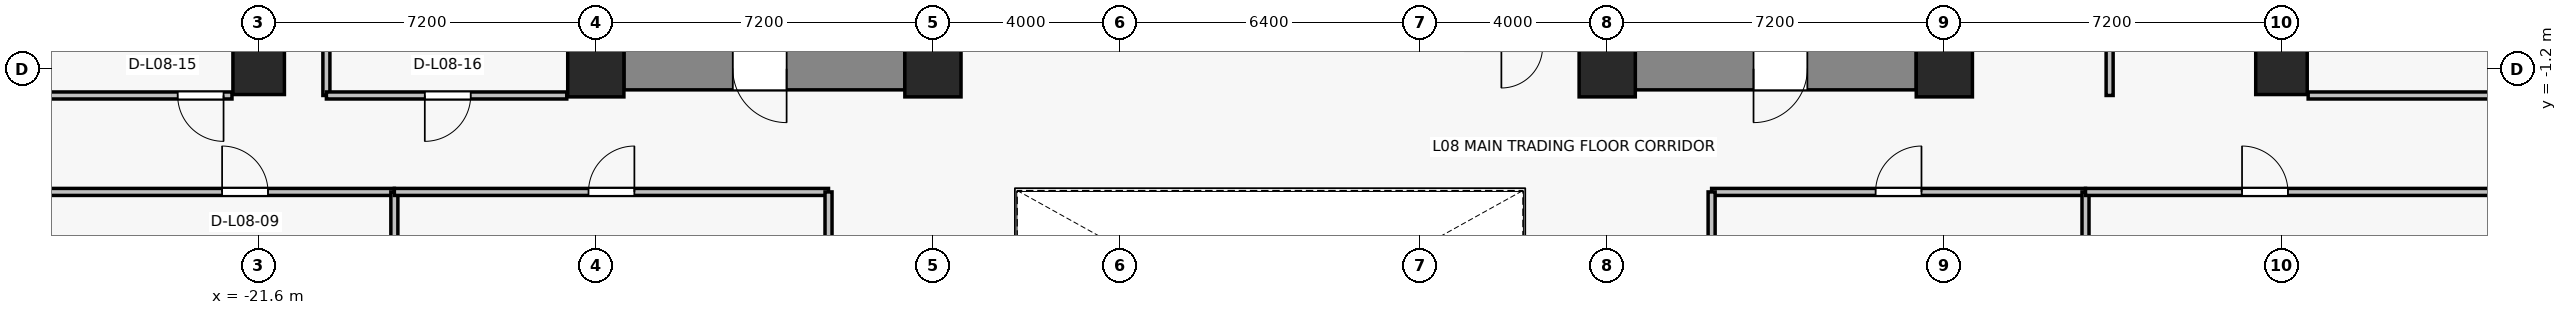
"""IFC4 building model, lengths in metres.
Left out: names, types, materials, properties, quantities, classifications, styles, units other than length and angle.
Written with IfcOpenShell. Run it as: python <this file> out.ifc"""

import sys

from ifc_helpers import new_model, si_unit, direction, frame, frame_2d, origin, origin_2d, place, context, subcontext, project, spatial, rectangle, extrude, source, transform, mapped, element, fill, save


model = new_model("IFC4")
c1 = context("Model", 3, precision=1e-05, world=origin(), true_north=direction((0.0, 1.0)))
c2 = subcontext(c1, "Body", "Model", "MODEL_VIEW")
j1 = project(units=[si_unit("LENGTHUNIT", "METRE"), si_unit("PLANEANGLEUNIT", "RADIAN")], contexts=[c1])
p1 = place(None, origin())
s1 = spatial("IfcSite", under=j1, at=p1, CompositionType="ELEMENT")
p2 = place(p1, origin())
s2 = spatial("IfcBuilding", under=s1, at=p2, CompositionType="ELEMENT")
p3 = place(p2, frame((0.0, 0.0, 34.0)))
s3 = spatial("IfcBuildingStorey", under=s2, at=p3, CompositionType="ELEMENT", Elevation=34.0)
for number, where, z_axis, x_axis in (
    (1, (-14.4, -1.2, 0.0), (0.0, 0.0, 1.0), (1.0, 0.0, 0.0)),
    (2, (-7.2, -1.2, 0.0), (0.0, 0.0, 1.0), (1.0, 0.0, 0.0)),
    (3, (7.2, -1.2, 0.0), (0.0, 0.0, 1.0), (1.0, 0.0, 0.0)),
    (4, (14.4, -1.2, 0.0), (0.0, 0.0, 1.0), (1.0, 0.0, 0.0)),
):
    element("IfcColumn", number, at=place(p3, frame(where, z_axis=z_axis, x_axis=x_axis)), inside=s3, PredefinedType="COLUMN", context=c2, shape_type="SweptSolid", body=[
        extrude(rectangle(XDim=1.2, YDim=1.2, at=origin_2d()), origin(), (0.0, 0.0, 1.0), 3.3),
    ])
for number, where, z_axis, x_axis in (
    (5, (-21.6, -1.2, 0.0), (0.0, 0.0, 1.0), (1.0, 0.0, 0.0)),
    (6, (21.6, -1.2, 0.0), (0.0, 0.0, 1.0), (1.0, 0.0, 0.0)),
):
    element("IfcColumn", number, at=place(p3, frame(where, z_axis=z_axis, x_axis=x_axis)), inside=s3, PredefinedType="COLUMN", context=c2, shape_type="SweptSolid", body=[
        extrude(rectangle(XDim=1.1, YDim=1.1, at=origin_2d()), origin(), (0.0, 0.0, 1.0), 3.3),
    ])
p4 = place(p3, frame((-7.8, -1.2, 0.0), z_axis=(0.0, 0.0, 1.0), x_axis=(-1.0, 0.0, 0.0)))
e7 = element("IfcWall", 7, at=p4, inside=s3, PredefinedType="SHEAR", context=c2, shape_type="SweptSolid", body=[
    extrude(rectangle(XDim=6.0, YDim=0.9, at=frame_2d((3.0, 0.0))), origin(), (0.0, 0.0, 1.0), 3.075),
])
p5 = place(p4, frame((2.525, 0.0, 0.0)))
e8 = element("IfcOpeningElement", 8, at=p5, cuts=e7, PredefinedType="OPENING", context=c2, shape_type="SweptSolid", body=[
    extrude(rectangle(XDim=1.15, YDim=2.15, at=frame_2d((0.575, 1.075))), frame((0.0, 0.46, 0.0), z_axis=(0.0, -1.0, 0.0), x_axis=(1.0, 0.0, 0.0)), (0.0, 0.0, 1.0), 0.92),
])
p6 = place(p3, frame((13.8, -1.2, 0.0), z_axis=(0.0, 0.0, 1.0), x_axis=(-1.0, 0.0, 0.0)))
e9 = element("IfcWall", 9, at=p6, inside=s3, PredefinedType="SHEAR", context=c2, shape_type="SweptSolid", body=[
    extrude(rectangle(XDim=6.0, YDim=0.9, at=frame_2d((3.0, 0.0))), origin(), (0.0, 0.0, 1.0), 3.075),
])
p7 = place(p6, frame((2.325, 0.0, 0.0)))
e10 = element("IfcOpeningElement", 10, at=p7, cuts=e9, PredefinedType="OPENING", context=c2, shape_type="SweptSolid", body=[
    extrude(rectangle(XDim=1.15, YDim=2.15, at=frame_2d((0.575, 1.075))), frame((0.0, 0.46, 0.0), z_axis=(0.0, -1.0, 0.0), x_axis=(1.0, 0.0, 0.0)), (0.0, 0.0, 1.0), 0.92),
])
p8 = place(p3, frame((-32.53, -3.83, 0.0), z_axis=(0.0, 0.0, 1.0), x_axis=(1.0, 0.0, 0.0)))
e11 = element("IfcWall", 11, at=p8, inside=s3, PredefinedType="PARTITIONING", context=c2, shape_type="SweptSolid", body=[
    extrude(rectangle(XDim=13.828, YDim=0.15, at=frame_2d((6.914, 0.0))), origin(), (0.0, 0.0, 1.0), 2.465),
])
p9 = place(p8, frame((10.149, 0.0, 0.0)))
e12 = element("IfcOpeningElement", 12, at=p9, cuts=e11, PredefinedType="OPENING", context=c2, shape_type="SweptSolid", body=[
    extrude(rectangle(XDim=0.98, YDim=2.15, at=frame_2d((0.49, 1.075))), frame((0.0, 0.085, 0.0), z_axis=(0.0, -1.0, 0.0), x_axis=(1.0, 0.0, 0.0)), (0.0, 0.0, 1.0), 0.17),
])
p10 = place(p3, frame((-18.702, -3.83, 0.0), z_axis=(0.0, 0.0, 1.0), x_axis=(0.0, -1.0, 0.0)))
e13 = element("IfcWall", 13, at=p10, inside=s3, PredefinedType="PARTITIONING", context=c2, shape_type="SweptSolid", body=[
    extrude(rectangle(XDim=6.69, YDim=0.15, at=frame_2d((3.345, 0.0))), origin(), (0.0, 0.0, 1.0), 2.465),
])
p11 = place(p3, frame((-18.702, -3.83, 0.0), z_axis=(0.0, 0.0, 1.0), x_axis=(1.0, 0.0, 0.0)))
e14 = element("IfcWall", 14, at=p11, inside=s3, PredefinedType="PARTITIONING", context=c2, shape_type="SweptSolid", body=[
    extrude(rectangle(XDim=9.272, YDim=0.15, at=frame_2d((4.636, 0.0))), origin(), (0.0, 0.0, 1.0), 2.465),
])
p12 = place(p11, frame((4.146, 0.0, 0.0)))
e15 = element("IfcOpeningElement", 15, at=p12, cuts=e14, PredefinedType="OPENING", context=c2, shape_type="SweptSolid", body=[
    extrude(rectangle(XDim=0.98, YDim=2.15, at=frame_2d((0.49, 1.075))), frame((0.0, 0.085, 0.0), z_axis=(0.0, -1.0, 0.0), x_axis=(1.0, 0.0, 0.0)), (0.0, 0.0, 1.0), 0.17),
])
p13 = place(p3, frame((-9.43, -3.83, 0.0), z_axis=(0.0, 0.0, 1.0), x_axis=(0.0, -1.0, 0.0)))
e16 = element("IfcWall", 16, at=p13, inside=s3, PredefinedType="PARTITIONING", context=c2, shape_type="SweptSolid", body=[
    extrude(rectangle(XDim=6.69, YDim=0.15, at=frame_2d((3.345, 0.0))), origin(), (0.0, 0.0, 1.0), 2.465),
])
p14 = place(p3, frame((9.43, -3.83, 0.0), z_axis=(0.0, 0.0, 1.0), x_axis=(1.0, 0.0, 0.0)))
e17 = element("IfcWall", 17, at=p14, inside=s3, PredefinedType="PARTITIONING", context=c2, shape_type="SweptSolid", body=[
    extrude(rectangle(XDim=7.985, YDim=0.15, at=frame_2d((3.993, 0.0))), origin(), (0.0, 0.0, 1.0), 2.465),
])
p15 = place(p14, frame((3.502, 0.0, 0.0)))
e18 = element("IfcOpeningElement", 18, at=p15, cuts=e17, PredefinedType="OPENING", context=c2, shape_type="SweptSolid", body=[
    extrude(rectangle(XDim=0.98, YDim=2.15, at=frame_2d((0.49, 1.075))), frame((0.0, 0.085, 0.0), z_axis=(0.0, -1.0, 0.0), x_axis=(1.0, 0.0, 0.0)), (0.0, 0.0, 1.0), 0.17),
])
for number, where, z_axis, x_axis in (
    (19, (9.43, -10.52, 0.0), (0.0, 0.0, 1.0), (0.0, 1.0, 0.0)),
    (20, (17.415, -3.83, 0.0), (0.0, 0.0, 1.0), (0.0, -1.0, 0.0)),
):
    element("IfcWall", number, at=place(p3, frame(where, z_axis=z_axis, x_axis=x_axis)), inside=s3, PredefinedType="PARTITIONING", context=c2, shape_type="SweptSolid", body=[
        extrude(rectangle(XDim=6.69, YDim=0.15, at=frame_2d((3.345, 0.0))), origin(), (0.0, 0.0, 1.0), 2.465),
    ])
p16 = place(p3, frame((17.415, -3.83, 0.0), z_axis=(0.0, 0.0, 1.0), x_axis=(1.0, 0.0, 0.0)))
e21 = element("IfcWall", 21, at=p16, inside=s3, PredefinedType="PARTITIONING", context=c2, shape_type="SweptSolid", body=[
    extrude(rectangle(XDim=11.115, YDim=0.15, at=frame_2d((5.558, 0.0))), origin(), (0.0, 0.0, 1.0), 2.465),
])
p17 = place(p16, frame((3.343, 0.0, 0.0)))
e22 = element("IfcOpeningElement", 22, at=p17, cuts=e21, PredefinedType="OPENING", context=c2, shape_type="SweptSolid", body=[
    extrude(rectangle(XDim=0.98, YDim=2.15, at=frame_2d((0.49, 1.075))), frame((0.0, 0.085, 0.0), z_axis=(0.0, -1.0, 0.0), x_axis=(1.0, 0.0, 0.0)), (0.0, 0.0, 1.0), 0.17),
])
p18 = place(p3, frame((-22.17, -1.77, 0.0), z_axis=(0.0, 0.0, 1.0), x_axis=(-1.0, 0.0, 0.0)))
e23 = element("IfcWall", 23, at=p18, inside=s3, PredefinedType="PARTITIONING", context=c2, shape_type="SweptSolid", body=[
    extrude(rectangle(XDim=5.177, YDim=0.15, at=frame_2d((2.588, 0.0))), origin(), (0.0, 0.0, 1.0), 3.075),
])
p19 = place(p18, frame((0.18, 0.0, 0.0)))
e24 = element("IfcOpeningElement", 24, at=p19, cuts=e23, PredefinedType="OPENING", context=c2, shape_type="SweptSolid", body=[
    extrude(rectangle(XDim=0.98, YDim=2.15, at=frame_2d((0.49, 1.075))), frame((0.0, 0.085, 0.0), z_axis=(0.0, -1.0, 0.0), x_axis=(1.0, 0.0, 0.0)), (0.0, 0.0, 1.0), 0.17),
])
p20 = place(p3, frame((-20.154, 13.88, 0.0), z_axis=(0.0, 0.0, 1.0), x_axis=(0.0, -1.0, 0.0)))
e25 = element("IfcWall", 25, at=p20, inside=s3, PredefinedType="PARTITIONING", context=c2, shape_type="SweptSolid", body=[
    extrude(rectangle(XDim=15.65, YDim=0.15, at=frame_2d((7.825, 0.0))), origin(), (0.0, 0.0, 1.0), 2.465),
])
p21 = place(p3, frame((-15.02, -1.77, 0.0), z_axis=(0.0, 0.0, 1.0), x_axis=(-1.0, 0.0, 0.0)))
e26 = element("IfcWall", 26, at=p21, inside=s3, PredefinedType="PARTITIONING", context=c2, shape_type="SweptSolid", body=[
    extrude(rectangle(XDim=5.134, YDim=0.15, at=frame_2d((2.567, 0.0))), origin(), (0.0, 0.0, 1.0), 3.075),
])
p22 = place(p21, frame((2.052, 0.0, 0.0)))
e27 = element("IfcOpeningElement", 27, at=p22, cuts=e26, PredefinedType="OPENING", context=c2, shape_type="SweptSolid", body=[
    extrude(rectangle(XDim=0.98, YDim=2.15, at=frame_2d((0.49, 1.075))), frame((0.0, 0.085, 0.0), z_axis=(0.0, -1.0, 0.0), x_axis=(1.0, 0.0, 0.0)), (0.0, 0.0, 1.0), 0.17),
])
p23 = place(p3, frame((28.53, -1.77, 0.0), z_axis=(0.0, 0.0, 1.0), x_axis=(-1.0, 0.0, 0.0)))
e28 = element("IfcWall", 28, at=p23, inside=s3, PredefinedType="PARTITIONING", context=c2, shape_type="SweptSolid", body=[
    extrude(rectangle(XDim=6.36, YDim=0.15, at=frame_2d((3.18, 0.0))), origin(), (0.0, 0.0, 1.0), 2.465),
])
p24 = place(p3, frame((17.93, -1.77, 0.0), z_axis=(0.0, 0.0, 1.0), x_axis=(0.0, 1.0, 0.0)))
e29 = element("IfcWall", 29, at=p24, inside=s3, PredefinedType="PARTITIONING", context=c2, shape_type="SweptSolid", body=[
    extrude(rectangle(XDim=9.103, YDim=0.15, at=frame_2d((4.551, 0.0))), origin(), (0.0, 0.0, 1.0), 2.465),
])
p25 = place(p24, frame((4.061, 0.0, 0.0)))
e30 = element("IfcOpeningElement", 30, at=p25, cuts=e29, PredefinedType="OPENING", context=c2, shape_type="SweptSolid", body=[
    extrude(rectangle(XDim=0.98, YDim=2.15, at=frame_2d((0.49, 1.075))), frame((0.0, 0.085, 0.0), z_axis=(0.0, -1.0, 0.0), x_axis=(1.0, 0.0, 0.0)), (0.0, 0.0, 1.0), 0.17),
])
m1 = source(origin(), c2, "Body", "SweptSolid", [
    extrude(rectangle(XDim=1.15, YDim=2.15, at=frame_2d((0.575, 1.075))), frame((0.0, 0.025, 0.0), z_axis=(0.0, -1.0, 0.0), x_axis=(1.0, 0.0, 0.0)), (0.0, 0.0, 1.0), 0.05),
])
p26 = place(p5, origin())
e31 = element("IfcDoor", 31, at=p26, inside=s3, OperationType="SINGLE_SWING_LEFT", PredefinedType="DOOR", context=c2, shape_type="MappedRepresentation", body=[
    mapped(m1, transform((0.0, 0.0, 0.0), x_axis=(1.0, 0.0, 0.0), y_axis=(0.0, 1.0, 0.0), z_axis=(0.0, 0.0, 1.0), scale=1.0)),
])
fill(e8, e31)
p27 = place(p7, origin())
e32 = element("IfcDoor", 32, at=p27, inside=s3, OperationType="SINGLE_SWING_RIGHT", PredefinedType="DOOR", context=c2, shape_type="MappedRepresentation", body=[
    mapped(m1, transform((0.0, 0.0, 0.0), x_axis=(1.0, 0.0, 0.0), y_axis=(0.0, 1.0, 0.0), z_axis=(0.0, 0.0, 1.0), scale=1.0)),
])
fill(e10, e32)
m2 = source(origin(), c2, "Body", "SweptSolid", [
    extrude(rectangle(XDim=0.98, YDim=2.15, at=frame_2d((0.49, 1.075))), frame((0.0, 0.025, 0.0), z_axis=(0.0, -1.0, 0.0), x_axis=(1.0, 0.0, 0.0)), (0.0, 0.0, 1.0), 0.05),
])
p28 = place(p9, origin())
e33 = element("IfcDoor", 33, at=p28, inside=s3, OperationType="SINGLE_SWING_LEFT", PredefinedType="DOOR", context=c2, shape_type="MappedRepresentation", body=[
    mapped(m2, transform((0.0, 0.0, 0.0), x_axis=(1.0, 0.0, 0.0), y_axis=(0.0, 1.0, 0.0), z_axis=(0.0, 0.0, 1.0), scale=1.0)),
])
fill(e12, e33)
p29 = place(p12, origin())
e34 = element("IfcDoor", 34, at=p29, inside=s3, OperationType="SINGLE_SWING_RIGHT", PredefinedType="DOOR", context=c2, shape_type="MappedRepresentation", body=[
    mapped(m2, transform((0.0, 0.0, 0.0), x_axis=(1.0, 0.0, 0.0), y_axis=(0.0, 1.0, 0.0), z_axis=(0.0, 0.0, 1.0), scale=1.0)),
])
fill(e15, e34)
p30 = place(p15, origin())
e35 = element("IfcDoor", 35, at=p30, inside=s3, OperationType="SINGLE_SWING_RIGHT", PredefinedType="DOOR", context=c2, shape_type="MappedRepresentation", body=[
    mapped(m2, transform((0.0, 0.0, 0.0), x_axis=(1.0, 0.0, 0.0), y_axis=(0.0, 1.0, 0.0), z_axis=(0.0, 0.0, 1.0), scale=1.0)),
])
fill(e18, e35)
p31 = place(p17, origin())
e36 = element("IfcDoor", 36, at=p31, inside=s3, OperationType="SINGLE_SWING_LEFT", PredefinedType="DOOR", context=c2, shape_type="MappedRepresentation", body=[
    mapped(m2, transform((0.0, 0.0, 0.0), x_axis=(1.0, 0.0, 0.0), y_axis=(0.0, 1.0, 0.0), z_axis=(0.0, 0.0, 1.0), scale=1.0)),
])
fill(e22, e36)
p32 = place(p19, origin())
e37 = element("IfcDoor", 37, at=p32, inside=s3, OperationType="SINGLE_SWING_LEFT", PredefinedType="DOOR", context=c2, shape_type="MappedRepresentation", body=[
    mapped(m2, transform((0.0, 0.0, 0.0), x_axis=(1.0, 0.0, 0.0), y_axis=(0.0, 1.0, 0.0), z_axis=(0.0, 0.0, 1.0), scale=1.0)),
])
fill(e24, e37)
p33 = place(p22, origin())
e38 = element("IfcDoor", 38, at=p33, inside=s3, OperationType="SINGLE_SWING_RIGHT", PredefinedType="DOOR", context=c2, shape_type="MappedRepresentation", body=[
    mapped(m2, transform((0.0, 0.0, 0.0), x_axis=(1.0, 0.0, 0.0), y_axis=(0.0, 1.0, 0.0), z_axis=(0.0, 0.0, 1.0), scale=1.0)),
])
fill(e27, e38)
save(model, sys.argv[1])
